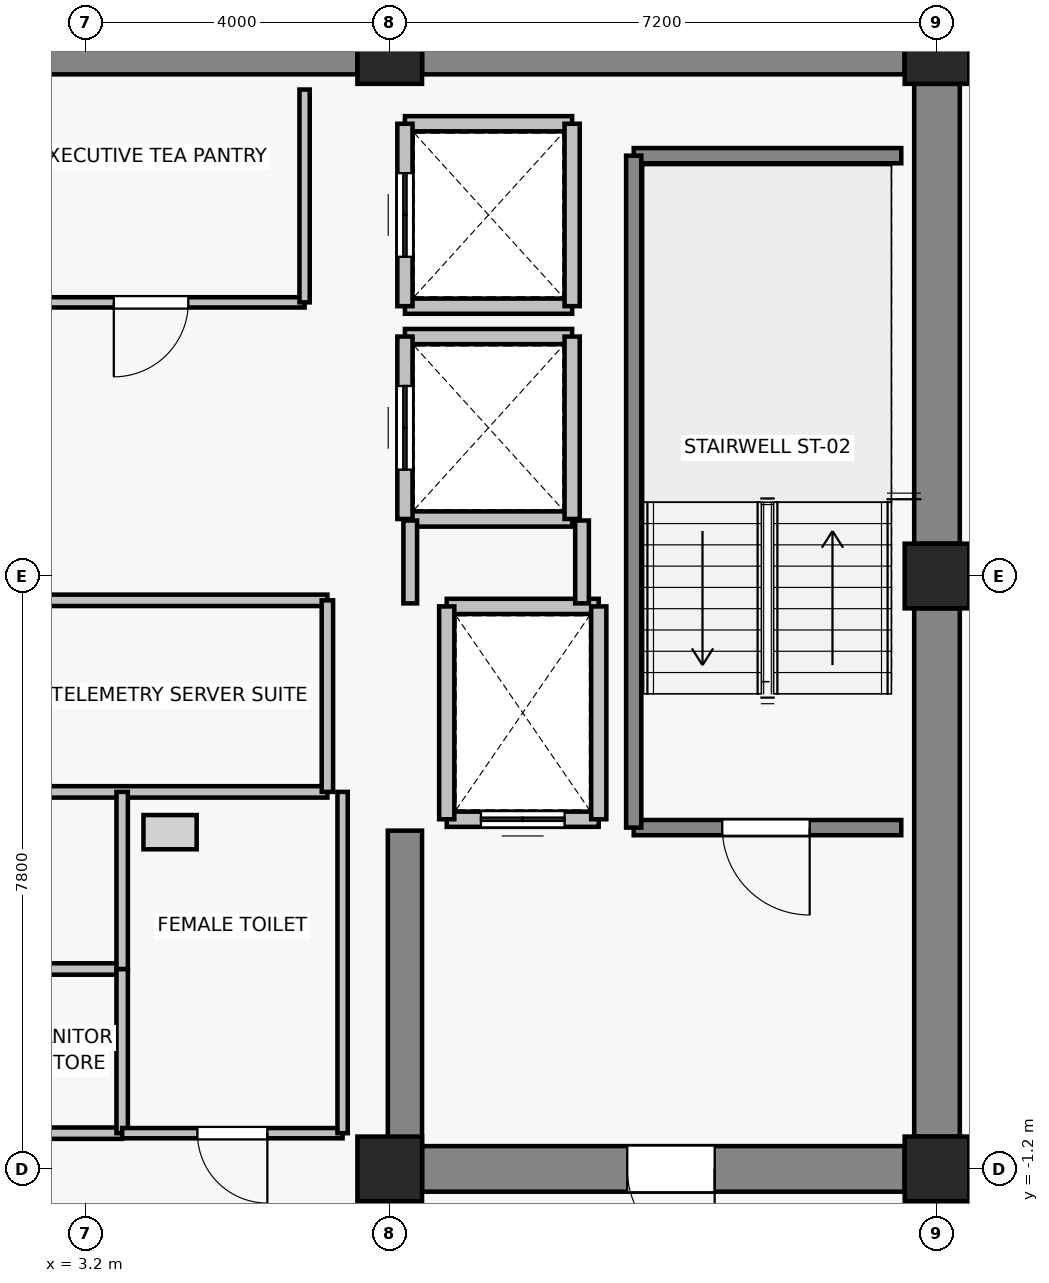
"""IFC4 building model, lengths in metres.
Left out: names, types, materials, properties, quantities, classifications, styles, units other than length and angle.
Written with IfcOpenShell. Run it as: python <this file> out.ifc"""

import sys

from ifc_helpers import new_model, si_unit, direction, frame, frame_2d, origin, origin_2d, place, context, subcontext, project, spatial, rectangle, extrude, source, transform, mapped, element, fill, save


model = new_model("IFC4")
c1 = context("Model", 3, precision=1e-05, world=origin(), true_north=direction((0.0, 1.0)))
c2 = subcontext(c1, "Body", "Model", "MODEL_VIEW")
j1 = project(units=[si_unit("LENGTHUNIT", "METRE"), si_unit("PLANEANGLEUNIT", "RADIAN")], contexts=[c1])
p1 = place(None, origin())
s1 = spatial("IfcSite", under=j1, at=p1, CompositionType="ELEMENT")
p2 = place(p1, origin())
s2 = spatial("IfcBuilding", under=s1, at=p2, CompositionType="ELEMENT")
p3 = place(p2, frame((0.0, 0.0, 261.7)))
s3 = spatial("IfcBuildingStorey", under=s2, at=p3, CompositionType="ELEMENT", Elevation=261.7)
for number, where, z_axis, x_axis in (
    (1, (7.2, -1.2, 0.0), (0.0, 0.0, 1.0), (1.0, 0.0, 0.0)),
    (2, (14.4, -1.2, 0.0), (0.0, 0.0, 1.0), (1.0, 0.0, 0.0)),
    (3, (14.4, 6.6, 0.0), (0.0, 0.0, 1.0), (1.0, 0.0, 0.0)),
    (4, (7.2, 13.5, 0.0), (0.0, 0.0, 1.0), (1.0, 0.0, 0.0)),
    (5, (14.4, 13.5, 0.0), (0.0, 0.0, 1.0), (1.0, 0.0, 0.0)),
):
    element("IfcColumn", number, at=place(p3, frame(where, z_axis=z_axis, x_axis=x_axis)), inside=s3, PredefinedType="COLUMN", context=c2, shape_type="SweptSolid", body=[
        extrude(rectangle(XDim=0.85, YDim=0.85, at=origin_2d()), origin(), (0.0, 0.0, 1.0), 3.3),
    ])
p4 = place(p3, frame((-6.775, 13.5, 0.0), z_axis=(0.0, 0.0, 1.0), x_axis=(1.0, 0.0, 0.0)))
e6 = element("IfcWall", 6, at=p4, inside=s3, PredefinedType="SHEAR", context=c2, shape_type="SweptSolid", body=[
    extrude(rectangle(XDim=13.55, YDim=0.6, at=frame_2d((6.775, 0.0))), origin(), (0.0, 0.0, 1.0), 3.075),
])
p5 = place(p3, frame((7.625, 13.5, 0.0), z_axis=(0.0, 0.0, 1.0), x_axis=(1.0, 0.0, 0.0)))
e7 = element("IfcWall", 7, at=p5, inside=s3, PredefinedType="SHEAR", context=c2, shape_type="SweptSolid", body=[
    extrude(rectangle(XDim=6.35, YDim=0.6, at=frame_2d((3.175, 0.0))), origin(), (0.0, 0.0, 1.0), 3.075),
])
p6 = place(p3, frame((14.4, -0.775, 0.0), z_axis=(0.0, 0.0, 1.0), x_axis=(0.0, 1.0, 0.0)))
e8 = element("IfcWall", 8, at=p6, inside=s3, PredefinedType="SHEAR", context=c2, shape_type="SweptSolid", body=[
    extrude(rectangle(XDim=6.95, YDim=0.6, at=frame_2d((3.475, 0.0))), origin(), (0.0, 0.0, 1.0), 3.075),
])
p7 = place(p3, frame((14.4, 7.025, 0.0), z_axis=(0.0, 0.0, 1.0), x_axis=(0.0, 1.0, 0.0)))
e9 = element("IfcWall", 9, at=p7, inside=s3, PredefinedType="SHEAR", context=c2, shape_type="SweptSolid", body=[
    extrude(rectangle(XDim=6.05, YDim=0.6, at=frame_2d((3.025, 0.0))), origin(), (0.0, 0.0, 1.0), 3.075),
])
p8 = place(p3, frame((13.975, -1.2, 0.0), z_axis=(0.0, 0.0, 1.0), x_axis=(-1.0, 0.0, 0.0)))
e10 = element("IfcWall", 10, at=p8, inside=s3, PredefinedType="SHEAR", context=c2, shape_type="SweptSolid", body=[
    extrude(rectangle(XDim=6.35, YDim=0.6, at=frame_2d((3.175, 0.0))), origin(), (0.0, 0.0, 1.0), 3.075),
])
p9 = place(p8, frame((2.5, 0.0, 0.0)))
e11 = element("IfcOpeningElement", 11, at=p9, cuts=e10, PredefinedType="OPENING", context=c2, shape_type="SweptSolid", body=[
    extrude(rectangle(XDim=1.15, YDim=2.15, at=frame_2d((0.575, 1.075))), frame((0.0, 0.31, 0.0), z_axis=(0.0, -1.0, 0.0), x_axis=(1.0, 0.0, 0.0)), (0.0, 0.0, 1.0), 0.62),
])
p10 = place(p3, frame((7.4, -0.9, 0.0), z_axis=(0.0, 0.0, 1.0), x_axis=(0.0, 1.0, 0.0)))
e12 = element("IfcWall", 12, at=p10, inside=s3, PredefinedType="SHEAR", context=c2, shape_type="SweptSolid", body=[
    extrude(rectangle(XDim=4.15, YDim=0.45, at=frame_2d((2.075, 0.0))), origin(), (0.0, 0.0, 1.0), 3.075),
])
p11 = place(p3, frame((9.95, 3.4, 0.0), z_axis=(0.0, 0.0, 1.0), x_axis=(-1.0, 0.0, 0.0)))
e13 = element("IfcWall", 13, at=p11, inside=s3, PredefinedType="SOLIDWALL", context=c2, shape_type="SweptSolid", body=[
    extrude(rectangle(XDim=2.0, YDim=0.2, at=frame_2d((1.0, 0.0))), origin(), (0.0, 0.0, 1.0), 3.075),
])
p12 = place(p11, frame((0.45, 0.0, 0.0)))
e14 = element("IfcOpeningElement", 14, at=p12, cuts=e13, PredefinedType="OPENING", context=c2, shape_type="SweptSolid", body=[
    extrude(rectangle(XDim=1.1, YDim=2.2, at=frame_2d((0.55, 1.1))), frame((0.0, 0.11, 0.0), z_axis=(0.0, -1.0, 0.0), x_axis=(1.0, 0.0, 0.0)), (0.0, 0.0, 1.0), 0.22),
])
p13 = place(p3, frame((7.95, 6.2, 0.0), z_axis=(0.0, 0.0, 1.0), x_axis=(1.0, 0.0, 0.0)))
e15 = element("IfcWall", 15, at=p13, inside=s3, PredefinedType="SOLIDWALL", context=c2, shape_type="SweptSolid", body=[
    extrude(rectangle(XDim=2.0, YDim=0.2, at=frame_2d((1.0, 0.0))), origin(), (0.0, 0.0, 1.0), 3.075),
])
for number, where, z_axis, x_axis in (
    (16, (7.95, 3.4, 0.0), (0.0, 0.0, 1.0), (0.0, 1.0, 0.0)),
    (17, (9.95, 6.2, 0.0), (0.0, 0.0, 1.0), (0.0, -1.0, 0.0)),
):
    element("IfcWall", number, at=place(p3, frame(where, z_axis=z_axis, x_axis=x_axis)), inside=s3, PredefinedType="SOLIDWALL", context=c2, shape_type="SweptSolid", body=[
        extrude(rectangle(XDim=2.8, YDim=0.2, at=frame_2d((1.4, 0.0))), origin(), (0.0, 0.0, 1.0), 3.075),
    ])
for number, where, z_axis, x_axis in (
    (18, (9.6, 7.35, 0.0), (0.0, 0.0, 1.0), (-1.0, 0.0, 0.0)),
    (19, (7.4, 9.75, 0.0), (0.0, 0.0, 1.0), (1.0, 0.0, 0.0)),
):
    element("IfcWall", number, at=place(p3, frame(where, z_axis=z_axis, x_axis=x_axis)), inside=s3, PredefinedType="SOLIDWALL", context=c2, shape_type="SweptSolid", body=[
        extrude(rectangle(XDim=2.2, YDim=0.2, at=frame_2d((1.1, 0.0))), origin(), (0.0, 0.0, 1.0), 2.615),
    ])
p14 = place(p3, frame((7.4, 7.35, 0.0), z_axis=(0.0, 0.0, 1.0), x_axis=(0.0, 1.0, 0.0)))
e20 = element("IfcWall", 20, at=p14, inside=s3, PredefinedType="SOLIDWALL", context=c2, shape_type="SweptSolid", body=[
    extrude(rectangle(XDim=2.4, YDim=0.2, at=frame_2d((1.2, 0.0))), origin(), (0.0, 0.0, 1.0), 2.615),
])
p15 = place(p14, frame((0.65, 0.0, 0.0)))
e21 = element("IfcOpeningElement", 21, at=p15, cuts=e20, PredefinedType="OPENING", context=c2, shape_type="SweptSolid", body=[
    extrude(rectangle(XDim=1.1, YDim=2.2, at=frame_2d((0.55, 1.1))), frame((0.0, 0.11, 0.0), z_axis=(0.0, -1.0, 0.0), x_axis=(1.0, 0.0, 0.0)), (0.0, 0.0, 1.0), 0.22),
])
p16 = place(p3, frame((9.6, 9.75, 0.0), z_axis=(0.0, 0.0, 1.0), x_axis=(0.0, -1.0, 0.0)))
e22 = element("IfcWall", 22, at=p16, inside=s3, PredefinedType="SOLIDWALL", context=c2, shape_type="SweptSolid", body=[
    extrude(rectangle(XDim=2.4, YDim=0.2, at=frame_2d((1.2, 0.0))), origin(), (0.0, 0.0, 1.0), 3.075),
])
for number, where, z_axis, x_axis in (
    (23, (9.6, 10.15, 0.0), (0.0, 0.0, 1.0), (-1.0, 0.0, 0.0)),
    (24, (7.4, 12.55, 0.0), (0.0, 0.0, 1.0), (1.0, 0.0, 0.0)),
):
    element("IfcWall", number, at=place(p3, frame(where, z_axis=z_axis, x_axis=x_axis)), inside=s3, PredefinedType="SOLIDWALL", context=c2, shape_type="SweptSolid", body=[
        extrude(rectangle(XDim=2.2, YDim=0.2, at=frame_2d((1.1, 0.0))), origin(), (0.0, 0.0, 1.0), 2.615),
    ])
p17 = place(p3, frame((7.4, 10.15, 0.0), z_axis=(0.0, 0.0, 1.0), x_axis=(0.0, 1.0, 0.0)))
e25 = element("IfcWall", 25, at=p17, inside=s3, PredefinedType="SOLIDWALL", context=c2, shape_type="SweptSolid", body=[
    extrude(rectangle(XDim=2.4, YDim=0.2, at=frame_2d((1.2, 0.0))), origin(), (0.0, 0.0, 1.0), 2.615),
])
p18 = place(p17, frame((0.65, 0.0, 0.0)))
e26 = element("IfcOpeningElement", 26, at=p18, cuts=e25, PredefinedType="OPENING", context=c2, shape_type="SweptSolid", body=[
    extrude(rectangle(XDim=1.1, YDim=2.2, at=frame_2d((0.55, 1.1))), frame((0.0, 0.11, 0.0), z_axis=(0.0, -1.0, 0.0), x_axis=(1.0, 0.0, 0.0)), (0.0, 0.0, 1.0), 0.22),
])
p19 = place(p3, frame((9.6, 12.55, 0.0), z_axis=(0.0, 0.0, 1.0), x_axis=(0.0, -1.0, 0.0)))
e27 = element("IfcWall", 27, at=p19, inside=s3, PredefinedType="SOLIDWALL", context=c2, shape_type="SweptSolid", body=[
    extrude(rectangle(XDim=2.4, YDim=0.2, at=frame_2d((1.2, 0.0))), origin(), (0.0, 0.0, 1.0), 3.075),
])
p20 = place(p3, frame((13.93, 3.29, 0.0), z_axis=(0.0, 0.0, 1.0), x_axis=(-1.0, 0.0, 0.0)))
e28 = element("IfcWall", 28, at=p20, inside=s3, PredefinedType="SOLIDWALL", context=c2, shape_type="SweptSolid", body=[
    extrude(rectangle(XDim=3.52, YDim=0.2, at=frame_2d((1.76, 0.0))), origin(), (0.0, 0.0, 1.0), 3.075),
])
p21 = place(p20, frame((1.205, 0.0, 0.0)))
e29 = element("IfcOpeningElement", 29, at=p21, cuts=e28, PredefinedType="OPENING", context=c2, shape_type="SweptSolid", body=[
    extrude(rectangle(XDim=1.15, YDim=2.15, at=frame_2d((0.575, 1.075))), frame((0.0, 0.11, 0.0), z_axis=(0.0, -1.0, 0.0), x_axis=(1.0, 0.0, 0.0)), (0.0, 0.0, 1.0), 0.22),
])
p22 = place(p3, frame((10.41, 12.13, 0.0), z_axis=(0.0, 0.0, 1.0), x_axis=(1.0, 0.0, 0.0)))
e30 = element("IfcWall", 30, at=p22, inside=s3, PredefinedType="SOLIDWALL", context=c2, shape_type="SweptSolid", body=[
    extrude(rectangle(XDim=3.52, YDim=0.2, at=frame_2d((1.76, 0.0))), origin(), (0.0, 0.0, 1.0), 3.075),
])
p23 = place(p3, frame((10.41, 3.29, 0.0), z_axis=(0.0, 0.0, 1.0), x_axis=(0.0, 1.0, 0.0)))
e31 = element("IfcWall", 31, at=p23, inside=s3, PredefinedType="SOLIDWALL", context=c2, shape_type="SweptSolid", body=[
    extrude(rectangle(XDim=8.84, YDim=0.2, at=frame_2d((4.42, 0.0))), origin(), (0.0, 0.0, 1.0), 3.075),
])
p24 = place(p3, frame((7.47, 6.24, 0.0), z_axis=(0.0, 0.0, 1.0), x_axis=(0.0, 1.0, 0.0)))
e32 = element("IfcWall", 32, at=p24, inside=s3, PredefinedType="PARTITIONING", context=c2, shape_type="SweptSolid", body=[
    extrude(rectangle(XDim=1.09, YDim=0.18, at=frame_2d((0.545, 0.0))), origin(), (0.0, 0.0, 1.0), 2.615),
])
p25 = place(p3, frame((9.73, 7.33, 0.0), z_axis=(0.0, 0.0, 1.0), x_axis=(0.0, -1.0, 0.0)))
e33 = element("IfcWall", 33, at=p25, inside=s3, PredefinedType="PARTITIONING", context=c2, shape_type="SweptSolid", body=[
    extrude(rectangle(XDim=1.09, YDim=0.18, at=frame_2d((0.545, 0.0))), origin(), (0.0, 0.0, 1.0), 3.075),
])
p26 = place(p3, frame((6.08, 10.2, 0.0), z_axis=(0.0, 0.0, 1.0), x_axis=(-1.0, 0.0, 0.0)))
e34 = element("IfcWall", 34, at=p26, inside=s3, PredefinedType="PARTITIONING", context=c2, shape_type="SweptSolid", body=[
    extrude(rectangle(XDim=4.04, YDim=0.135, at=frame_2d((2.02, 0.0))), origin(), (0.0, 0.0, 1.0), 3.075),
])
p27 = place(p26, frame((1.53, 0.0, 0.0)))
e35 = element("IfcOpeningElement", 35, at=p27, cuts=e34, PredefinedType="OPENING", context=c2, shape_type="SweptSolid", body=[
    extrude(rectangle(XDim=0.98, YDim=2.15, at=frame_2d((0.49, 1.075))), frame((0.0, 0.077, 0.0), z_axis=(0.0, -1.0, 0.0), x_axis=(1.0, 0.0, 0.0)), (0.0, 0.0, 1.0), 0.155),
])
p28 = place(p3, frame((6.08, 13.0, 0.0), z_axis=(0.0, 0.0, 1.0), x_axis=(0.0, -1.0, 0.0)))
e36 = element("IfcWall", 36, at=p28, inside=s3, PredefinedType="PARTITIONING", context=c2, shape_type="SweptSolid", body=[
    extrude(rectangle(XDim=2.8, YDim=0.135, at=frame_2d((1.4, 0.0))), origin(), (0.0, 0.0, 1.0), 3.075),
])
for number, where, z_axis, x_axis in (
    (37, (6.38, 3.76, 0.0), (0.0, 0.0, 1.0), (-1.0, 0.0, 0.0)),
    (38, (1.47, 6.28, 0.0), (0.0, 0.0, 1.0), (1.0, 0.0, 0.0)),
):
    element("IfcWall", number, at=place(p3, frame(where, z_axis=z_axis, x_axis=x_axis)), inside=s3, PredefinedType="PARTITIONING", context=c2, shape_type="SweptSolid", body=[
        extrude(rectangle(XDim=4.91, YDim=0.15, at=frame_2d((2.455, 0.0))), origin(), (0.0, 0.0, 1.0), 3.075),
    ])
p29 = place(p3, frame((6.38, 6.28, 0.0), z_axis=(0.0, 0.0, 1.0), x_axis=(0.0, -1.0, 0.0)))
e39 = element("IfcWall", 39, at=p29, inside=s3, PredefinedType="PARTITIONING", context=c2, shape_type="SweptSolid", body=[
    extrude(rectangle(XDim=2.52, YDim=0.15, at=frame_2d((1.26, 0.0))), origin(), (0.0, 0.0, 1.0), 3.075),
])
for number, where, z_axis, x_axis in (
    (40, (3.68, -0.73, 0.0), (0.0, 0.0, 1.0), (-1.0, 0.0, 0.0)),
    (41, (1.47, 1.43, 0.0), (0.0, 0.0, 1.0), (1.0, 0.0, 0.0)),
):
    element("IfcWall", number, at=place(p3, frame(where, z_axis=z_axis, x_axis=x_axis)), inside=s3, PredefinedType="PARTITIONING", context=c2, shape_type="SweptSolid", body=[
        extrude(rectangle(XDim=2.21, YDim=0.15, at=frame_2d((1.105, 0.0))), origin(), (0.0, 0.0, 1.0), 3.075),
    ])
p30 = place(p3, frame((3.68, 1.43, 0.0), z_axis=(0.0, 0.0, 1.0), x_axis=(0.0, -1.0, 0.0)))
e42 = element("IfcWall", 42, at=p30, inside=s3, PredefinedType="PARTITIONING", context=c2, shape_type="SweptSolid", body=[
    extrude(rectangle(XDim=2.16, YDim=0.15, at=frame_2d((1.08, 0.0))), origin(), (0.0, 0.0, 1.0), 3.075),
])
p31 = place(p3, frame((3.68, 3.76, 0.0), z_axis=(0.0, 0.0, 1.0), x_axis=(0.0, -1.0, 0.0)))
e43 = element("IfcWall", 43, at=p31, inside=s3, PredefinedType="PARTITIONING", context=c2, shape_type="SweptSolid", body=[
    extrude(rectangle(XDim=2.33, YDim=0.15, at=frame_2d((1.165, 0.0))), origin(), (0.0, 0.0, 1.0), 3.075),
])
p32 = place(p3, frame((6.58, -0.73, 0.0), z_axis=(0.0, 0.0, 1.0), x_axis=(-1.0, 0.0, 0.0)))
e44 = element("IfcWall", 44, at=p32, inside=s3, PredefinedType="PARTITIONING", context=c2, shape_type="SweptSolid", body=[
    extrude(rectangle(XDim=2.9, YDim=0.135, at=frame_2d((1.45, 0.0))), origin(), (0.0, 0.0, 1.0), 3.075),
])
p33 = place(p32, frame((0.99, 0.0, 0.0)))
e45 = element("IfcOpeningElement", 45, at=p33, cuts=e44, PredefinedType="OPENING", context=c2, shape_type="SweptSolid", body=[
    extrude(rectangle(XDim=0.92, YDim=2.1, at=frame_2d((0.46, 1.05))), frame((0.0, 0.077, 0.0), z_axis=(0.0, -1.0, 0.0), x_axis=(1.0, 0.0, 0.0)), (0.0, 0.0, 1.0), 0.155),
])
p34 = place(p3, frame((6.58, 3.76, 0.0), z_axis=(0.0, 0.0, 1.0), x_axis=(0.0, -1.0, 0.0)))
e46 = element("IfcWall", 46, at=p34, inside=s3, PredefinedType="PARTITIONING", context=c2, shape_type="SweptSolid", body=[
    extrude(rectangle(XDim=4.49, YDim=0.135, at=frame_2d((2.245, 0.0))), origin(), (0.0, 0.0, 1.0), 3.075),
])
m1 = source(origin(), c2, "Body", "SweptSolid", [
    extrude(rectangle(XDim=1.1, YDim=2.2, at=frame_2d((0.55, 1.1))), frame((0.0, 0.025, 0.0), z_axis=(0.0, -1.0, 0.0), x_axis=(1.0, 0.0, 0.0)), (0.0, 0.0, 1.0), 0.05),
])
p35 = place(p12, origin())
e47 = element("IfcDoor", 47, at=p35, inside=s3, OperationType="DOUBLE_DOOR_SLIDING", PredefinedType="DOOR", context=c2, shape_type="MappedRepresentation", body=[
    mapped(m1, transform((0.0, 0.0, 0.0), x_axis=(1.0, 0.0, 0.0), y_axis=(0.0, 1.0, 0.0), z_axis=(0.0, 0.0, 1.0), scale=1.0)),
])
fill(e14, e47)
p36 = place(p15, origin())
e48 = element("IfcDoor", 48, at=p36, inside=s3, OperationType="DOUBLE_DOOR_SLIDING", PredefinedType="DOOR", context=c2, shape_type="MappedRepresentation", body=[
    mapped(m1, transform((0.0, 0.0, 0.0), x_axis=(1.0, 0.0, 0.0), y_axis=(0.0, 1.0, 0.0), z_axis=(0.0, 0.0, 1.0), scale=1.0)),
])
fill(e21, e48)
p37 = place(p18, origin())
e49 = element("IfcDoor", 49, at=p37, inside=s3, OperationType="DOUBLE_DOOR_SLIDING", PredefinedType="DOOR", context=c2, shape_type="MappedRepresentation", body=[
    mapped(m1, transform((0.0, 0.0, 0.0), x_axis=(1.0, 0.0, 0.0), y_axis=(0.0, 1.0, 0.0), z_axis=(0.0, 0.0, 1.0), scale=1.0)),
])
fill(e26, e49)
m2 = source(origin(), c2, "Body", "SweptSolid", [
    extrude(rectangle(XDim=1.15, YDim=2.15, at=frame_2d((0.575, 1.075))), frame((0.0, 0.025, 0.0), z_axis=(0.0, -1.0, 0.0), x_axis=(1.0, 0.0, 0.0)), (0.0, 0.0, 1.0), 0.05),
])
p38 = place(p21, origin())
e50 = element("IfcDoor", 50, at=p38, inside=s3, OperationType="SINGLE_SWING_LEFT", PredefinedType="DOOR", context=c2, shape_type="MappedRepresentation", body=[
    mapped(m2, transform((0.0, 0.0, 0.0), x_axis=(1.0, 0.0, 0.0), y_axis=(0.0, 1.0, 0.0), z_axis=(0.0, 0.0, 1.0), scale=1.0)),
])
fill(e29, e50)
p39 = place(p9, origin())
e51 = element("IfcDoor", 51, at=p39, inside=s3, OperationType="SINGLE_SWING_LEFT", PredefinedType="DOOR", context=c2, shape_type="MappedRepresentation", body=[
    mapped(m2, transform((0.0, 0.0, 0.0), x_axis=(1.0, 0.0, 0.0), y_axis=(0.0, 1.0, 0.0), z_axis=(0.0, 0.0, 1.0), scale=1.0)),
])
fill(e11, e51)
m3 = source(origin(), c2, "Body", "SweptSolid", [
    extrude(rectangle(XDim=0.98, YDim=2.15, at=frame_2d((0.49, 1.075))), frame((0.0, 0.025, 0.0), z_axis=(0.0, -1.0, 0.0), x_axis=(1.0, 0.0, 0.0)), (0.0, 0.0, 1.0), 0.05),
])
p40 = place(p27, origin())
e52 = element("IfcDoor", 52, at=p40, inside=s3, OperationType="SINGLE_SWING_RIGHT", PredefinedType="DOOR", context=c2, shape_type="MappedRepresentation", body=[
    mapped(m3, transform((0.0, 0.0, 0.0), x_axis=(1.0, 0.0, 0.0), y_axis=(0.0, 1.0, 0.0), z_axis=(0.0, 0.0, 1.0), scale=1.0)),
])
fill(e35, e52)
m4 = source(origin(), c2, "Body", "SweptSolid", [
    extrude(rectangle(XDim=0.92, YDim=2.1, at=frame_2d((0.46, 1.05))), frame((0.0, 0.025, 0.0), z_axis=(0.0, -1.0, 0.0), x_axis=(1.0, 0.0, 0.0)), (0.0, 0.0, 1.0), 0.05),
])
p41 = place(p33, origin())
e53 = element("IfcDoor", 53, at=p41, inside=s3, OperationType="SINGLE_SWING_LEFT", PredefinedType="DOOR", context=c2, shape_type="MappedRepresentation", body=[
    mapped(m4, transform((0.0, 0.0, 0.0), x_axis=(1.0, 0.0, 0.0), y_axis=(0.0, 1.0, 0.0), z_axis=(0.0, 0.0, 1.0), scale=1.0)),
])
fill(e45, e53)
save(model, sys.argv[1])
